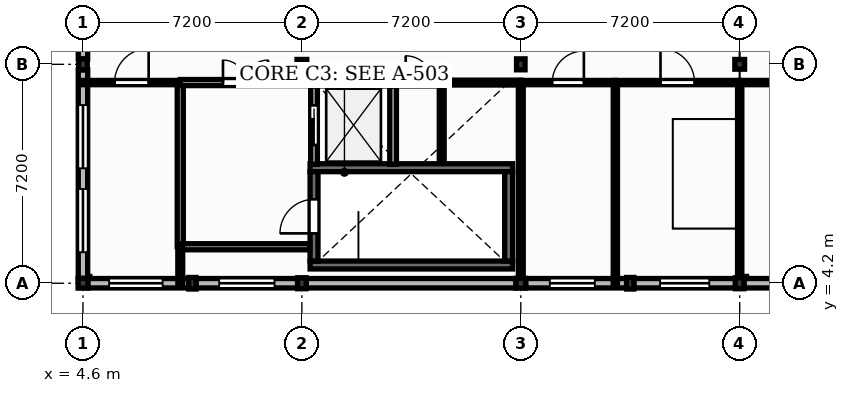
"""IFC4 building model, lengths in metres.
Left out: names, types, materials, properties, quantities, classifications, styles, units other than length and angle.
Written with IfcOpenShell. Run it as: python <this file> out.ifc"""

import sys

from ifc_helpers import new_model, si_unit, direction, frame, frame_2d, origin, origin_2d, place, context, subcontext, project, spatial, rectangle, extrude, element, fill, save


model = new_model("IFC4")
c1 = context("Model", 3, precision=1e-05, world=origin(), true_north=direction((0.0, 1.0)))
c2 = subcontext(c1, "Body", "Model", "MODEL_VIEW")
j1 = project(units=[si_unit("LENGTHUNIT", "METRE"), si_unit("PLANEANGLEUNIT", "RADIAN")], contexts=[c1])
p1 = place(None, origin())
s1 = spatial("IfcSite", under=j1, at=p1, CompositionType="ELEMENT")
p2 = place(p1, origin())
s2 = spatial("IfcBuilding", under=s1, at=p2, CompositionType="ELEMENT")
p3 = place(p2, frame((0.0, 0.0, 9.0)))
s3 = spatial("IfcBuildingStorey", under=s2, at=p3, CompositionType="ELEMENT", Elevation=9.0)
p4 = place(p3, frame((4.6, 4.2, 0.0), z_axis=(0.0, 0.0, 1.0), x_axis=(1.0, 0.0, 0.0)))
e1 = element("IfcColumn", 1, at=p4, inside=s3, PredefinedType="COLUMN", context=c2, shape_type="SweptSolid", body=[
    extrude(rectangle(XDim=0.32, YDim=0.32, at=origin_2d()), origin(), (0.0, 0.0, 1.0), 3.95),
])
for number, where, z_axis, x_axis in (
    (2, (4.6, 11.4, 0.0), (0.0, 0.0, 1.0), (1.0, 0.0, 0.0)),
    (3, (11.8, 4.2, 0.0), (0.0, 0.0, 1.0), (1.0, 0.0, 0.0)),
):
    element("IfcColumn", number, at=place(p3, frame(where, z_axis=z_axis, x_axis=x_axis)), inside=s3, PredefinedType="COLUMN", context=c2, shape_type="SweptSolid", body=[
        extrude(rectangle(XDim=0.28, YDim=0.36, at=origin_2d()), origin(), (0.0, 0.0, 1.0), 3.95),
    ])
for number, where, z_axis, x_axis in (
    (4, (11.8, 11.4, 0.0), (0.0, 0.0, 1.0), (1.0, 0.0, 0.0)),
    (5, (19.0, 4.2, 0.0), (0.0, 0.0, 1.0), (1.0, 0.0, 0.0)),
):
    element("IfcColumn", number, at=place(p3, frame(where, z_axis=z_axis, x_axis=x_axis)), inside=s3, PredefinedType="COLUMN", context=c2, shape_type="SweptSolid", body=[
        extrude(rectangle(XDim=0.32, YDim=0.32, at=origin_2d()), origin(), (0.0, 0.0, 1.0), 3.95),
    ])
for number, where, z_axis, x_axis in (
    (6, (19.0, 11.4, 0.0), (0.0, 0.0, 1.0), (1.0, 0.0, 0.0)),
    (7, (26.2, 4.2, 0.0), (0.0, 0.0, 1.0), (1.0, 0.0, 0.0)),
):
    element("IfcColumn", number, at=place(p3, frame(where, z_axis=z_axis, x_axis=x_axis)), inside=s3, PredefinedType="COLUMN", context=c2, shape_type="SweptSolid", body=[
        extrude(rectangle(XDim=0.28, YDim=0.36, at=origin_2d()), origin(), (0.0, 0.0, 1.0), 3.95),
    ])
p5 = place(p3, frame((26.2, 11.4, 0.0), z_axis=(0.0, 0.0, 1.0), x_axis=(1.0, 0.0, 0.0)))
e8 = element("IfcColumn", 8, at=p5, inside=s3, PredefinedType="COLUMN", context=c2, shape_type="SweptSolid", body=[
    extrude(rectangle(XDim=0.32, YDim=0.32, at=origin_2d()), origin(), (0.0, 0.0, 1.0), 3.95),
])
for number, where, z_axis, x_axis in (
    (9, (8.2, 4.2, 0.0), (0.0, 0.0, 1.0), (1.0, 0.0, 0.0)),
    (10, (22.6, 4.2, 0.0), (0.0, 0.0, 1.0), (1.0, 0.0, 0.0)),
):
    element("IfcColumn", number, at=place(p3, frame(where, z_axis=z_axis, x_axis=x_axis)), inside=s3, PredefinedType="PILASTER", context=c2, shape_type="SweptSolid", body=[
        extrude(rectangle(XDim=0.24, YDim=0.38, at=origin_2d()), origin(), (0.0, 0.0, 1.0), 3.95),
    ])
p6 = place(p3, frame((4.76, 4.2, 0.0), z_axis=(0.0, 0.0, 1.0), x_axis=(1.0, 0.0, 0.0)))
e11 = element("IfcWall", 11, at=p6, inside=s3, PredefinedType="SOLIDWALL", context=c2, shape_type="SweptSolid", body=[
    extrude(rectangle(XDim=3.32, YDim=0.31, at=frame_2d((1.66, 0.0))), origin(), (0.0, 0.0, 1.0), 3.49),
])
p7 = place(p6, frame((0.7, 0.0, 1.0)))
e12 = element("IfcOpeningElement", 12, at=p7, cuts=e11, PredefinedType="OPENING", context=c2, shape_type="SweptSolid", body=[
    extrude(rectangle(XDim=1.76, YDim=1.95, at=frame_2d((0.88, 0.975))), frame((0.0, 0.165, 0.0), z_axis=(0.0, -1.0, 0.0), x_axis=(1.0, 0.0, 0.0)), (0.0, 0.0, 1.0), 0.33),
])
p8 = place(p3, frame((8.32, 4.2, 0.0), z_axis=(0.0, 0.0, 1.0), x_axis=(1.0, 0.0, 0.0)))
e13 = element("IfcWall", 13, at=p8, inside=s3, PredefinedType="SOLIDWALL", context=c2, shape_type="SweptSolid", body=[
    extrude(rectangle(XDim=3.34, YDim=0.31, at=frame_2d((1.67, 0.0))), origin(), (0.0, 0.0, 1.0), 3.49),
])
p9 = place(p8, frame((0.76, 0.0, 1.05)))
e14 = element("IfcOpeningElement", 14, at=p9, cuts=e13, PredefinedType="OPENING", context=c2, shape_type="SweptSolid", body=[
    extrude(rectangle(XDim=1.82, YDim=1.65, at=frame_2d((0.91, 0.825))), frame((0.0, 0.165, 0.0), z_axis=(0.0, -1.0, 0.0), x_axis=(1.0, 0.0, 0.0)), (0.0, 0.0, 1.0), 0.33),
])
p10 = place(p3, frame((4.6, 4.36, 0.0), z_axis=(0.0, 0.0, 1.0), x_axis=(0.0, 1.0, 0.0)))
e15 = element("IfcWall", 15, at=p10, inside=s3, PredefinedType="SOLIDWALL", context=c2, shape_type="SweptSolid", body=[
    extrude(rectangle(XDim=6.86, YDim=0.31, at=frame_2d((3.43, 0.0))), origin(), (0.0, 0.0, 1.0), 3.49),
])
p11 = place(p10, frame((0.86, 0.0, 1.0)))
e16 = element("IfcOpeningElement", 16, at=p11, cuts=e15, PredefinedType="OPENING", context=c2, shape_type="SweptSolid", body=[
    extrude(rectangle(XDim=2.08, YDim=1.8, at=frame_2d((1.04, 0.9))), frame((0.0, 0.165, 0.0), z_axis=(0.0, -1.0, 0.0), x_axis=(1.0, 0.0, 0.0)), (0.0, 0.0, 1.0), 0.33),
])
p12 = place(p10, frame((3.62, 0.0, 1.0)))
e17 = element("IfcOpeningElement", 17, at=p12, cuts=e15, PredefinedType="OPENING", context=c2, shape_type="SweptSolid", body=[
    extrude(rectangle(XDim=2.08, YDim=1.8, at=frame_2d((1.04, 0.9))), frame((0.0, 0.165, 0.0), z_axis=(0.0, -1.0, 0.0), x_axis=(1.0, 0.0, 0.0)), (0.0, 0.0, 1.0), 0.33),
])
p13 = place(p3, frame((4.6, 11.58, 0.0), z_axis=(0.0, 0.0, 1.0), x_axis=(0.0, 1.0, 0.0)))
e18 = element("IfcWall", 18, at=p13, inside=s3, PredefinedType="SOLIDWALL", context=c2, shape_type="SweptSolid", body=[
    extrude(rectangle(XDim=6.86, YDim=0.31, at=frame_2d((3.43, 0.0))), origin(), (0.0, 0.0, 1.0), 3.49),
])
p14 = place(p13, frame((3.65, 0.0, 1.05)))
e19 = element("IfcOpeningElement", 19, at=p14, cuts=e18, PredefinedType="OPENING", context=c2, shape_type="SweptSolid", body=[
    extrude(rectangle(XDim=1.26, YDim=1.65, at=frame_2d((0.63, 0.825))), frame((0.0, 0.165, 0.0), z_axis=(0.0, -1.0, 0.0), x_axis=(1.0, 0.0, 0.0)), (0.0, 0.0, 1.0), 0.33),
])
p15 = place(p3, frame((11.94, 4.2, 0.0), z_axis=(0.0, 0.0, 1.0), x_axis=(1.0, 0.0, 0.0)))
e20 = element("IfcWall", 20, at=p15, inside=s3, PredefinedType="SOLIDWALL", context=c2, shape_type="SweptSolid", body=[
    extrude(rectangle(XDim=6.9, YDim=0.31, at=frame_2d((3.45, 0.0))), origin(), (0.0, 0.0, 1.0), 3.49),
])
p16 = place(p3, frame((19.16, 4.2, 0.0), z_axis=(0.0, 0.0, 1.0), x_axis=(1.0, 0.0, 0.0)))
e21 = element("IfcWall", 21, at=p16, inside=s3, PredefinedType="SOLIDWALL", context=c2, shape_type="SweptSolid", body=[
    extrude(rectangle(XDim=3.32, YDim=0.31, at=frame_2d((1.66, 0.0))), origin(), (0.0, 0.0, 1.0), 3.49),
])
p17 = place(p16, frame((0.795, 0.0, 1.0)))
e22 = element("IfcOpeningElement", 22, at=p17, cuts=e21, PredefinedType="OPENING", context=c2, shape_type="SweptSolid", body=[
    extrude(rectangle(XDim=1.48, YDim=1.95, at=frame_2d((0.74, 0.975))), frame((0.0, 0.165, 0.0), z_axis=(0.0, -1.0, 0.0), x_axis=(1.0, 0.0, 0.0)), (0.0, 0.0, 1.0), 0.33),
])
p18 = place(p3, frame((22.72, 4.2, 0.0), z_axis=(0.0, 0.0, 1.0), x_axis=(1.0, 0.0, 0.0)))
e23 = element("IfcWall", 23, at=p18, inside=s3, PredefinedType="SOLIDWALL", context=c2, shape_type="SweptSolid", body=[
    extrude(rectangle(XDim=3.34, YDim=0.31, at=frame_2d((1.67, 0.0))), origin(), (0.0, 0.0, 1.0), 3.49),
])
p19 = place(p18, frame((0.86, 0.0, 1.0)))
e24 = element("IfcOpeningElement", 24, at=p19, cuts=e23, PredefinedType="OPENING", context=c2, shape_type="SweptSolid", body=[
    extrude(rectangle(XDim=1.62, YDim=1.95, at=frame_2d((0.81, 0.975))), frame((0.0, 0.165, 0.0), z_axis=(0.0, -1.0, 0.0), x_axis=(1.0, 0.0, 0.0)), (0.0, 0.0, 1.0), 0.33),
])
p20 = place(p3, frame((26.34, 4.2, 0.0), z_axis=(0.0, 0.0, 1.0), x_axis=(1.0, 0.0, 0.0)))
e25 = element("IfcWall", 25, at=p20, inside=s3, PredefinedType="SOLIDWALL", context=c2, shape_type="SweptSolid", body=[
    extrude(rectangle(XDim=6.9, YDim=0.31, at=frame_2d((3.45, 0.0))), origin(), (0.0, 0.0, 1.0), 3.49),
])
p21 = place(p20, frame((1.21, 0.0, 1.0)))
e26 = element("IfcOpeningElement", 26, at=p21, cuts=e25, PredefinedType="OPENING", context=c2, shape_type="SweptSolid", body=[
    extrude(rectangle(XDim=1.9, YDim=1.95, at=frame_2d((0.95, 0.975))), frame((0.0, 0.165, 0.0), z_axis=(0.0, -1.0, 0.0), x_axis=(1.0, 0.0, 0.0)), (0.0, 0.0, 1.0), 0.33),
])
p22 = place(p20, frame((3.79, 0.0, 1.0)))
e27 = element("IfcOpeningElement", 27, at=p22, cuts=e25, PredefinedType="OPENING", context=c2, shape_type="SweptSolid", body=[
    extrude(rectangle(XDim=1.9, YDim=1.95, at=frame_2d((0.95, 0.975))), frame((0.0, 0.165, 0.0), z_axis=(0.0, -1.0, 0.0), x_axis=(1.0, 0.0, 0.0)), (0.0, 0.0, 1.0), 0.33),
])
for number, where, z_axis, x_axis in (
    (28, (12.07, 4.8, 0.0), (0.0, 0.0, 1.0), (1.0, 0.0, 0.0)),
    (29, (12.07, 8.0, 0.0), (0.0, 0.0, 1.0), (1.0, 0.0, 0.0)),
):
    element("IfcWall", number, at=place(p3, frame(where, z_axis=z_axis, x_axis=x_axis)), inside=s3, PredefinedType="SHEAR", context=c2, shape_type="SweptSolid", body=[
        extrude(rectangle(XDim=6.66, YDim=0.26, at=frame_2d((3.33, 0.0))), origin(), (0.0, 0.0, 1.0), 3.95),
    ])
p23 = place(p3, frame((12.2, 4.93, 0.0), z_axis=(0.0, 0.0, 1.0), x_axis=(0.0, 1.0, 0.0)))
e30 = element("IfcWall", 30, at=p23, inside=s3, PredefinedType="SHEAR", context=c2, shape_type="SweptSolid", body=[
    extrude(rectangle(XDim=2.94, YDim=0.26, at=frame_2d((1.47, 0.0))), origin(), (0.0, 0.0, 1.0), 3.95),
])
p24 = place(p23, frame((0.91, 0.0, 0.0)))
e31 = element("IfcOpeningElement", 31, at=p24, cuts=e30, PredefinedType="OPENING", context=c2, shape_type="SweptSolid", body=[
    extrude(rectangle(XDim=1.12, YDim=2.1, at=frame_2d((0.56, 1.05))), frame((0.0, 0.14, 0.0), z_axis=(0.0, -1.0, 0.0), x_axis=(1.0, 0.0, 0.0)), (0.0, 0.0, 1.0), 0.28),
])
p25 = place(p3, frame((18.6, 4.93, 0.0), z_axis=(0.0, 0.0, 1.0), x_axis=(0.0, 1.0, 0.0)))
e32 = element("IfcWall", 32, at=p25, inside=s3, PredefinedType="SHEAR", context=c2, shape_type="SweptSolid", body=[
    extrude(rectangle(XDim=2.94, YDim=0.26, at=frame_2d((1.47, 0.0))), origin(), (0.0, 0.0, 1.0), 3.95),
])
p26 = place(p3, frame((12.2, 10.8, 0.0), z_axis=(0.0, 0.0, 1.0), x_axis=(1.0, 0.0, 0.0)))
e33 = element("IfcWall", 33, at=p26, inside=s3, PredefinedType="SOLIDWALL", context=c2, shape_type="SweptSolid", body=[
    extrude(rectangle(XDim=2.6, YDim=0.22, at=frame_2d((1.3, 0.0))), origin(), (0.0, 0.0, 1.0), 3.95),
])
p27 = place(p3, frame((12.2, 8.11, 0.0), z_axis=(0.0, 0.0, 1.0), x_axis=(0.0, 1.0, 0.0)))
e34 = element("IfcWall", 34, at=p27, inside=s3, PredefinedType="SOLIDWALL", context=c2, shape_type="SweptSolid", body=[
    extrude(rectangle(XDim=2.58, YDim=0.22, at=frame_2d((1.29, 0.0))), origin(), (0.0, 0.0, 1.0), 3.95),
])
p28 = place(p27, frame((0.64, 0.0, 0.0)))
e35 = element("IfcOpeningElement", 35, at=p28, cuts=e34, PredefinedType="OPENING", context=c2, shape_type="SweptSolid", body=[
    extrude(rectangle(XDim=1.3, YDim=2.2, at=frame_2d((0.65, 1.1))), frame((0.0, 0.12, 0.0), z_axis=(0.0, -1.0, 0.0), x_axis=(1.0, 0.0, 0.0)), (0.0, 0.0, 1.0), 0.24),
])
p29 = place(p3, frame((14.8, 8.11, 0.0), z_axis=(0.0, 0.0, 1.0), x_axis=(0.0, 1.0, 0.0)))
e36 = element("IfcWall", 36, at=p29, inside=s3, PredefinedType="SOLIDWALL", context=c2, shape_type="SweptSolid", body=[
    extrude(rectangle(XDim=2.58, YDim=0.22, at=frame_2d((1.29, 0.0))), origin(), (0.0, 0.0, 1.0), 3.95),
])
p30 = place(p3, frame((4.6, 10.8, 0.0), z_axis=(0.0, 0.0, 1.0), x_axis=(1.0, 0.0, 0.0)))
e37 = element("IfcWall", 37, at=p30, inside=s3, PredefinedType="PARTITIONING", context=c2, shape_type="SweptSolid", body=[
    extrude(rectangle(XDim=3.2, YDim=0.14, at=frame_2d((1.6, 0.0))), origin(), (0.0, 0.0, 1.0), 3.91),
])
p31 = place(p30, frame((1.04, 0.0, 0.0)))
e38 = element("IfcOpeningElement", 38, at=p31, cuts=e37, PredefinedType="OPENING", context=c2, shape_type="SweptSolid", body=[
    extrude(rectangle(XDim=1.12, YDim=2.15, at=frame_2d((0.56, 1.075))), frame((0.0, 0.08, 0.0), z_axis=(0.0, -1.0, 0.0), x_axis=(1.0, 0.0, 0.0)), (0.0, 0.0, 1.0), 0.16),
])
p32 = place(p3, frame((7.8, 5.4, 0.0), z_axis=(0.0, 0.0, 1.0), x_axis=(0.0, 1.0, 0.0)))
e39 = element("IfcWall", 39, at=p32, inside=s3, PredefinedType="PARTITIONING", context=c2, shape_type="SweptSolid", body=[
    extrude(rectangle(XDim=5.33, YDim=0.2, at=frame_2d((2.665, 0.0))), origin(), (0.0, 0.0, 1.0), 3.91),
])
p33 = place(p3, frame((7.8, 10.8, 0.0), z_axis=(0.0, 0.0, 1.0), x_axis=(1.0, 0.0, 0.0)))
e40 = element("IfcWall", 40, at=p33, inside=s3, PredefinedType="PARTITIONING", context=c2, shape_type="SweptSolid", body=[
    extrude(rectangle(XDim=4.29, YDim=0.2, at=frame_2d((2.145, 0.0))), origin(), (0.0, 0.0, 1.0), 3.91),
])
p34 = place(p33, frame((1.405, 0.0, 0.0)))
e41 = element("IfcOpeningElement", 41, at=p34, cuts=e40, PredefinedType="OPENING", context=c2, shape_type="SweptSolid", body=[
    extrude(rectangle(XDim=1.48, YDim=2.25, at=frame_2d((0.74, 1.125))), frame((0.0, 0.11, 0.0), z_axis=(0.0, -1.0, 0.0), x_axis=(1.0, 0.0, 0.0)), (0.0, 0.0, 1.0), 0.22),
])
p35 = place(p3, frame((14.91, 10.8, 0.0), z_axis=(0.0, 0.0, 1.0), x_axis=(1.0, 0.0, 0.0)))
e42 = element("IfcWall", 42, at=p35, inside=s3, PredefinedType="SOLIDWALL", context=c2, shape_type="SweptSolid", body=[
    extrude(rectangle(XDim=1.49, YDim=0.22, at=frame_2d((0.745, 0.0))), origin(), (0.0, 0.0, 1.0), 3.91),
])
p36 = place(p35, frame((0.305, 0.0, 0.0)))
e43 = element("IfcOpeningElement", 43, at=p36, cuts=e42, PredefinedType="OPENING", context=c2, shape_type="SweptSolid", body=[
    extrude(rectangle(XDim=0.88, YDim=2.05, at=frame_2d((0.44, 1.025))), frame((0.0, 0.12, 0.0), z_axis=(0.0, -1.0, 0.0), x_axis=(1.0, 0.0, 0.0)), (0.0, 0.0, 1.0), 0.24),
])
p37 = place(p3, frame((19.0, 10.8, 0.0), z_axis=(0.0, 0.0, 1.0), x_axis=(1.0, 0.0, 0.0)))
e44 = element("IfcWall", 44, at=p37, inside=s3, PredefinedType="PARTITIONING", context=c2, shape_type="SweptSolid", body=[
    extrude(rectangle(XDim=3.11, YDim=0.14, at=frame_2d((1.555, 0.0))), origin(), (0.0, 0.0, 1.0), 3.91),
])
p38 = place(p37, frame((1.035, 0.0, 0.0)))
e45 = element("IfcOpeningElement", 45, at=p38, cuts=e44, PredefinedType="OPENING", context=c2, shape_type="SweptSolid", body=[
    extrude(rectangle(XDim=1.04, YDim=2.1, at=frame_2d((0.52, 1.05))), frame((0.0, 0.08, 0.0), z_axis=(0.0, -1.0, 0.0), x_axis=(1.0, 0.0, 0.0)), (0.0, 0.0, 1.0), 0.16),
])
p39 = place(p3, frame((22.11, 4.2, 0.0), z_axis=(0.0, 0.0, 1.0), x_axis=(0.0, 1.0, 0.0)))
e46 = element("IfcWall", 46, at=p39, inside=s3, PredefinedType="PARTITIONING", context=c2, shape_type="SweptSolid", body=[
    extrude(rectangle(XDim=6.53, YDim=0.14, at=frame_2d((3.265, 0.0))), origin(), (0.0, 0.0, 1.0), 3.91),
])
p40 = place(p3, frame((22.11, 10.8, 0.0), z_axis=(0.0, 0.0, 1.0), x_axis=(1.0, 0.0, 0.0)))
e47 = element("IfcWall", 47, at=p40, inside=s3, PredefinedType="PARTITIONING", context=c2, shape_type="SweptSolid", body=[
    extrude(rectangle(XDim=4.09, YDim=0.14, at=frame_2d((2.045, 0.0))), origin(), (0.0, 0.0, 1.0), 3.91),
])
p41 = place(p40, frame((1.485, 0.0, 0.0)))
e48 = element("IfcOpeningElement", 48, at=p41, cuts=e47, PredefinedType="OPENING", context=c2, shape_type="SweptSolid", body=[
    extrude(rectangle(XDim=1.12, YDim=2.15, at=frame_2d((0.56, 1.075))), frame((0.0, 0.08, 0.0), z_axis=(0.0, -1.0, 0.0), x_axis=(1.0, 0.0, 0.0)), (0.0, 0.0, 1.0), 0.16),
])
p42 = place(p3, frame((26.2, 4.38, 0.0), z_axis=(0.0, 0.0, 1.0), x_axis=(0.0, 1.0, 0.0)))
e49 = element("IfcWall", 49, at=p42, inside=s3, PredefinedType="PARTITIONING", context=c2, shape_type="SweptSolid", body=[
    extrude(rectangle(XDim=6.35, YDim=0.14, at=frame_2d((3.175, 0.0))), origin(), (0.0, 0.0, 1.0), 3.49),
])
p43 = place(p3, frame((26.2, 10.8, 0.0), z_axis=(0.0, 0.0, 1.0), x_axis=(1.0, 0.0, 0.0)))
e50 = element("IfcWall", 50, at=p43, inside=s3, PredefinedType="PARTITIONING", context=c2, shape_type="SweptSolid", body=[
    extrude(rectangle(XDim=7.2, YDim=0.14, at=frame_2d((3.6, 0.0))), origin(), (0.0, 0.0, 1.0), 3.91),
])
p44 = place(p43, frame((3.02, 0.0, 0.0)))
e51 = element("IfcOpeningElement", 51, at=p44, cuts=e50, PredefinedType="OPENING", context=c2, shape_type="SweptSolid", body=[
    extrude(rectangle(XDim=1.16, YDim=2.1, at=frame_2d((0.58, 1.05))), frame((0.0, 0.08, 0.0), z_axis=(0.0, -1.0, 0.0), x_axis=(1.0, 0.0, 0.0)), (0.0, 0.0, 1.0), 0.16),
])
p45 = place(p3, frame((16.4, 8.14, 0.0), z_axis=(0.0, 0.0, 1.0), x_axis=(0.0, 1.0, 0.0)))
e52 = element("IfcWall", 52, at=p45, inside=s3, PredefinedType="PARTITIONING", context=c2, shape_type="SweptSolid", body=[
    extrude(rectangle(XDim=2.59, YDim=0.16, at=frame_2d((1.295, 0.0))), origin(), (0.0, 0.0, 1.0), 3.91),
])
p46 = place(p3, frame((7.8, 5.4, 0.0), z_axis=(0.0, 0.0, 1.0), x_axis=(1.0, 0.0, 0.0)))
e53 = element("IfcWall", 53, at=p46, inside=s3, PredefinedType="PARTITIONING", context=c2, shape_type="SweptSolid", body=[
    extrude(rectangle(XDim=4.26, YDim=0.2, at=frame_2d((2.13, 0.0))), origin(), (0.0, 0.0, 1.0), 3.91),
])
p47 = place(p3, frame((16.4, 10.8, 0.0), z_axis=(0.0, 0.0, 1.0), x_axis=(1.0, 0.0, 0.0)))
e54 = element("IfcWall", 54, at=p47, inside=s3, PredefinedType="PARTITIONING", context=c2, shape_type="SweptSolid", body=[
    extrude(rectangle(XDim=2.6, YDim=0.16, at=frame_2d((1.3, 0.0))), origin(), (0.0, 0.0, 1.0), 3.96),
])
p48 = place(p3, frame((7.8, 4.2, 0.0), z_axis=(0.0, 0.0, 1.0), x_axis=(0.0, 1.0, 0.0)))
e55 = element("IfcWall", 55, at=p48, inside=s3, PredefinedType="PARTITIONING", context=c2, shape_type="SweptSolid", body=[
    extrude(rectangle(XDim=1.2, YDim=0.16, at=frame_2d((0.6, 0.0))), origin(), (0.0, 0.0, 1.0), 3.91),
])
p49 = place(p3, frame((19.0, 4.36, 0.0), z_axis=(0.0, 0.0, 1.0), x_axis=(0.0, 1.0, 0.0)))
e56 = element("IfcWall", 56, at=p49, inside=s3, PredefinedType="PARTITIONING", context=c2, shape_type="SweptSolid", body=[
    extrude(rectangle(XDim=6.37, YDim=0.16, at=frame_2d((3.185, 0.0))), origin(), (0.0, 0.0, 1.0), 3.49),
])
p50 = place(p7, origin())
e57 = element("IfcWindow", 57, at=p50, inside=s3, PartitioningType="DOUBLE_PANEL_VERTICAL", PredefinedType="WINDOW", context=c2, shape_type="SweptSolid", body=[
    extrude(rectangle(XDim=1.76, YDim=1.95, at=frame_2d((0.88, 0.975))), frame((0.0, 0.03, 0.0), z_axis=(0.0, -1.0, 0.0), x_axis=(1.0, 0.0, 0.0)), (0.0, 0.0, 1.0), 0.06),
])
fill(e12, e57)
p51 = place(p9, origin())
e58 = element("IfcWindow", 58, at=p51, inside=s3, PartitioningType="DOUBLE_PANEL_VERTICAL", PredefinedType="WINDOW", context=c2, shape_type="SweptSolid", body=[
    extrude(rectangle(XDim=1.82, YDim=1.65, at=frame_2d((0.91, 0.825))), frame((0.0, 0.03, 0.0), z_axis=(0.0, -1.0, 0.0), x_axis=(1.0, 0.0, 0.0)), (0.0, 0.0, 1.0), 0.06),
])
fill(e14, e58)
p52 = place(p11, origin())
e59 = element("IfcWindow", 59, at=p52, inside=s3, PartitioningType="DOUBLE_PANEL_VERTICAL", PredefinedType="WINDOW", context=c2, shape_type="SweptSolid", body=[
    extrude(rectangle(XDim=2.08, YDim=1.8, at=frame_2d((1.04, 0.9))), frame((0.0, 0.03, 0.0), z_axis=(0.0, -1.0, 0.0), x_axis=(1.0, 0.0, 0.0)), (0.0, 0.0, 1.0), 0.06),
])
fill(e16, e59)
p53 = place(p12, origin())
e60 = element("IfcWindow", 60, at=p53, inside=s3, PartitioningType="DOUBLE_PANEL_VERTICAL", PredefinedType="WINDOW", context=c2, shape_type="SweptSolid", body=[
    extrude(rectangle(XDim=2.08, YDim=1.8, at=frame_2d((1.04, 0.9))), frame((0.0, 0.03, 0.0), z_axis=(0.0, -1.0, 0.0), x_axis=(1.0, 0.0, 0.0)), (0.0, 0.0, 1.0), 0.06),
])
fill(e17, e60)
p54 = place(p17, origin())
e61 = element("IfcWindow", 61, at=p54, inside=s3, PartitioningType="SINGLE_PANEL", PredefinedType="WINDOW", context=c2, shape_type="SweptSolid", body=[
    extrude(rectangle(XDim=1.48, YDim=1.95, at=frame_2d((0.74, 0.975))), frame((0.0, 0.03, 0.0), z_axis=(0.0, -1.0, 0.0), x_axis=(1.0, 0.0, 0.0)), (0.0, 0.0, 1.0), 0.06),
])
fill(e22, e61)
p55 = place(p19, origin())
e62 = element("IfcWindow", 62, at=p55, inside=s3, PartitioningType="DOUBLE_PANEL_VERTICAL", PredefinedType="WINDOW", context=c2, shape_type="SweptSolid", body=[
    extrude(rectangle(XDim=1.62, YDim=1.95, at=frame_2d((0.81, 0.975))), frame((0.0, 0.03, 0.0), z_axis=(0.0, -1.0, 0.0), x_axis=(1.0, 0.0, 0.0)), (0.0, 0.0, 1.0), 0.06),
])
fill(e24, e62)
p56 = place(p28, origin())
e63 = element("IfcDoor", 63, at=p56, inside=s3, OperationType="SLIDING_TO_LEFT", PredefinedType="DOOR", context=c2, shape_type="SweptSolid", body=[
    extrude(rectangle(XDim=1.3, YDim=2.2, at=frame_2d((0.65, 1.1))), frame((0.0, 0.025, 0.0), z_axis=(0.0, -1.0, 0.0), x_axis=(1.0, 0.0, 0.0)), (0.0, 0.0, 1.0), 0.05),
])
fill(e35, e63)
p57 = place(p24, origin())
e64 = element("IfcDoor", 64, at=p57, inside=s3, OperationType="SINGLE_SWING_LEFT", PredefinedType="DOOR", context=c2, shape_type="SweptSolid", body=[
    extrude(rectangle(XDim=1.12, YDim=2.1, at=frame_2d((0.56, 1.05))), frame((0.0, 0.025, 0.0), z_axis=(0.0, -1.0, 0.0), x_axis=(1.0, 0.0, 0.0)), (0.0, 0.0, 1.0), 0.05),
])
fill(e31, e64)
p58 = place(p34, origin())
e65 = element("IfcDoor", 65, at=p58, inside=s3, OperationType="DOUBLE_DOOR_SINGLE_SWING", PredefinedType="DOOR", context=c2, shape_type="SweptSolid", body=[
    extrude(rectangle(XDim=1.48, YDim=2.25, at=frame_2d((0.74, 1.125))), frame((0.0, 0.025, 0.0), z_axis=(0.0, -1.0, 0.0), x_axis=(1.0, 0.0, 0.0)), (0.0, 0.0, 1.0), 0.05),
])
fill(e41, e65)
p59 = place(p36, origin())
e66 = element("IfcDoor", 66, at=p59, inside=s3, OperationType="SINGLE_SWING_LEFT", PredefinedType="DOOR", context=c2, shape_type="SweptSolid", body=[
    extrude(rectangle(XDim=0.88, YDim=2.05, at=frame_2d((0.44, 1.025))), frame((0.0, 0.025, 0.0), z_axis=(0.0, -1.0, 0.0), x_axis=(1.0, 0.0, 0.0)), (0.0, 0.0, 1.0), 0.05),
])
fill(e43, e66)
p60 = place(p31, origin())
e67 = element("IfcDoor", 67, at=p60, inside=s3, OperationType="SINGLE_SWING_RIGHT", PredefinedType="DOOR", context=c2, shape_type="SweptSolid", body=[
    extrude(rectangle(XDim=1.12, YDim=2.15, at=frame_2d((0.56, 1.075))), frame((0.0, 0.025, 0.0), z_axis=(0.0, -1.0, 0.0), x_axis=(1.0, 0.0, 0.0)), (0.0, 0.0, 1.0), 0.05),
])
fill(e38, e67)
p61 = place(p38, origin())
e68 = element("IfcDoor", 68, at=p61, inside=s3, OperationType="SINGLE_SWING_RIGHT", PredefinedType="DOOR", context=c2, shape_type="SweptSolid", body=[
    extrude(rectangle(XDim=1.04, YDim=2.1, at=frame_2d((0.52, 1.05))), frame((0.0, 0.025, 0.0), z_axis=(0.0, -1.0, 0.0), x_axis=(1.0, 0.0, 0.0)), (0.0, 0.0, 1.0), 0.05),
])
fill(e45, e68)
p62 = place(p41, origin())
e69 = element("IfcDoor", 69, at=p62, inside=s3, OperationType="SINGLE_SWING_LEFT", PredefinedType="DOOR", context=c2, shape_type="SweptSolid", body=[
    extrude(rectangle(XDim=1.12, YDim=2.15, at=frame_2d((0.56, 1.075))), frame((0.0, 0.025, 0.0), z_axis=(0.0, -1.0, 0.0), x_axis=(1.0, 0.0, 0.0)), (0.0, 0.0, 1.0), 0.05),
])
fill(e48, e69)
save(model, sys.argv[1])
